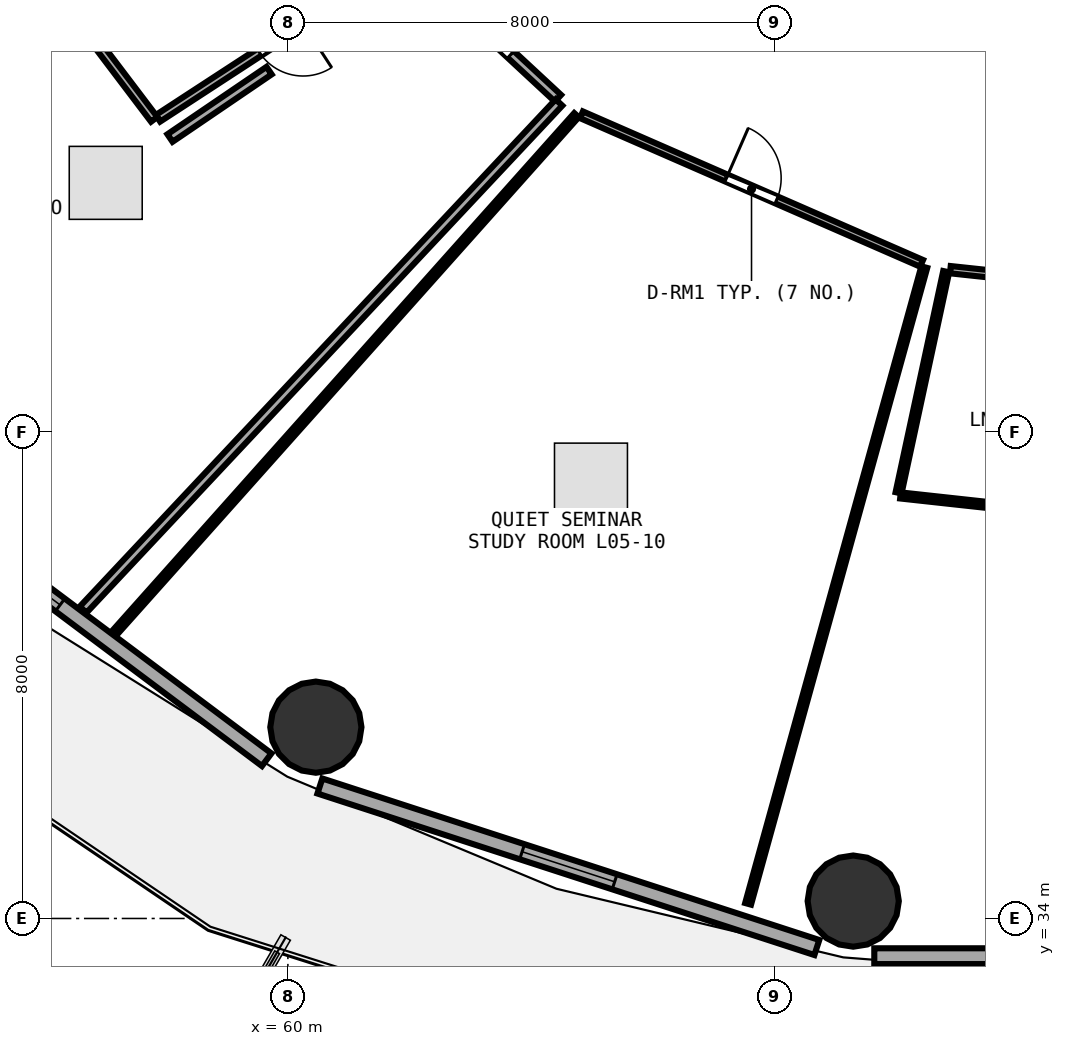
"""IFC4 building model, lengths in metres.
Left out: names, types, materials, properties, quantities, classifications, styles, units other than length and angle.
Written with IfcOpenShell. Run it as: python <this file> out.ifc"""

import sys

from ifc_helpers import new_model, si_unit, direction, frame, frame_2d, origin, origin_2d, place, context, subcontext, project, spatial, rectangle, circle, extrude, element, fill, save


model = new_model("IFC4")
c1 = context("Model", 3, precision=1e-05, world=origin(), true_north=direction((0.0, 1.0)))
c2 = subcontext(c1, "Body", "Model", "MODEL_VIEW")
j1 = project(units=[si_unit("LENGTHUNIT", "METRE"), si_unit("PLANEANGLEUNIT", "RADIAN")], contexts=[c1])
p1 = place(None, origin())
s1 = spatial("IfcSite", under=j1, at=p1, CompositionType="ELEMENT")
p2 = place(p1, origin())
s2 = spatial("IfcBuilding", under=s1, at=p2, CompositionType="ELEMENT")
p3 = place(p2, frame((0.0, 0.0, 22.5)))
s3 = spatial("IfcBuildingStorey", under=s2, at=p3, CompositionType="ELEMENT", Elevation=22.5)
for number, where, z_axis, x_axis in (
    (1, (60.46, 37.146, 0.0), (0.0, 0.0, 1.0), (1.0, 0.0, 0.0)),
    (2, (69.298, 34.286, 0.0), (0.0, 0.0, 1.0), (1.0, 0.0, 0.0)),
):
    element("IfcColumn", number, at=place(p3, frame(where, z_axis=z_axis, x_axis=x_axis)), inside=s3, PredefinedType="COLUMN", context=c2, shape_type="SweptSolid", body=[
        extrude(circle(Radius=0.75, at=origin_2d()), origin(), (0.0, 0.0, 1.0), 3.75),
    ])
p4 = place(p3, frame((53.016, 41.582, 0.0), z_axis=(0.0, 0.0, 1.0), x_axis=(0.80030733173, -0.599590005569, 0.0)))
e3 = element("IfcWall", 3, at=p4, inside=s3, PredefinedType="SOLIDWALL", context=c2, shape_type="SweptSolid", body=[
    extrude(rectangle(XDim=8.291, YDim=0.26, at=frame_2d((4.145, 0.0))), origin(), (0.0, 0.0, 1.0), 3.475),
])
p5 = place(p4, frame((2.445, 0.0, 0.85)))
e4 = element("IfcOpeningElement", 4, at=p5, cuts=e3, PredefinedType="OPENING", context=c2, shape_type="SweptSolid", body=[
    extrude(rectangle(XDim=1.6, YDim=1.45, at=frame_2d((0.8, 0.725))), frame((0.0, 0.14, 0.0), z_axis=(0.0, -1.0, 0.0), x_axis=(1.0, 0.0, 0.0)), (0.0, 0.0, 1.0), 0.28),
])
p6 = place(p3, frame((60.526, 36.178, 0.0), z_axis=(0.0, 0.0, 1.0), x_axis=(0.951039914291, -0.309068085421, 0.0)))
e5 = element("IfcWall", 5, at=p6, inside=s3, PredefinedType="SOLIDWALL", context=c2, shape_type="SweptSolid", body=[
    extrude(rectangle(XDim=8.594, YDim=0.26, at=frame_2d((4.297, 0.0))), origin(), (0.0, 0.0, 1.0), 3.475),
])
p7 = place(p6, frame((3.497, 0.0, 0.85)))
e6 = element("IfcOpeningElement", 6, at=p7, cuts=e5, PredefinedType="OPENING", context=c2, shape_type="SweptSolid", body=[
    extrude(rectangle(XDim=1.6, YDim=1.45, at=frame_2d((0.8, 0.725))), frame((0.0, 0.14, 0.0), z_axis=(0.0, -1.0, 0.0), x_axis=(1.0, 0.0, 0.0)), (0.0, 0.0, 1.0), 0.28),
])
p8 = place(p3, frame((69.644, 33.38, 0.0), z_axis=(0.0, 0.0, 1.0), x_axis=(1.0, 0.0, 0.0)))
e7 = element("IfcWall", 7, at=p8, inside=s3, PredefinedType="SOLIDWALL", context=c2, shape_type="SweptSolid", body=[
    extrude(rectangle(XDim=8.712, YDim=0.26, at=frame_2d((4.356, 0.0))), origin(), (0.0, 0.0, 1.0), 3.475),
])
p9 = place(p8, frame((4.456, 0.0, 0.85)))
e8 = element("IfcOpeningElement", 8, at=p9, cuts=e7, PredefinedType="OPENING", context=c2, shape_type="SweptSolid", body=[
    extrude(rectangle(XDim=1.6, YDim=1.45, at=frame_2d((0.8, 0.725))), frame((0.0, 0.14, 0.0), z_axis=(0.0, -1.0, 0.0), x_axis=(1.0, 0.0, 0.0)), (0.0, 0.0, 1.0), 0.28),
])
p10 = place(p3, frame((61.917, 49.8, 0.0), z_axis=(0.0, 0.0, 1.0), x_axis=(-0.837796261941, -0.545982988267, 0.0)))
e9 = element("IfcWall", 9, at=p10, inside=s3, PredefinedType="PLUMBINGWALL", context=c2, shape_type="SweptSolid", body=[
    extrude(rectangle(XDim=4.838, YDim=0.13, at=frame_2d((2.419, 0.0))), origin(), (0.0, 0.0, 1.0), 3.235),
])
p11 = place(p10, frame((1.989, 0.0, 0.0)))
e10 = element("IfcOpeningElement", 10, at=p11, cuts=e9, PredefinedType="OPENING", context=c2, shape_type="SweptSolid", body=[
    extrude(rectangle(XDim=0.86, YDim=2.05, at=frame_2d((0.43, 1.025))), frame((0.0, 0.075, 0.0), z_axis=(0.0, -1.0, 0.0), x_axis=(1.0, 0.0, 0.0)), (0.0, 0.0, 1.0), 0.15),
])
p12 = place(p3, frame((62.194, 49.575, 0.0), z_axis=(0.0, 0.0, 1.0), x_axis=(0.7329267348, -0.680307578538, 0.0)))
e11 = element("IfcWall", 11, at=p12, inside=s3, PredefinedType="PARTITIONING", context=c2, shape_type="SweptSolid", body=[
    extrude(rectangle(XDim=3.067, YDim=0.15, at=frame_2d((1.533, 0.0))), origin(), (0.0, 0.0, 1.0), 2.875),
])
p13 = place(p12, frame((1.059, 0.0, 0.0)))
e12 = element("IfcOpeningElement", 12, at=p13, cuts=e11, PredefinedType="OPENING", context=c2, shape_type="SweptSolid", body=[
    extrude(rectangle(XDim=0.95, YDim=2.08, at=frame_2d((0.475, 1.04))), frame((0.0, 0.085, 0.0), z_axis=(0.0, -1.0, 0.0), x_axis=(1.0, 0.0, 0.0)), (0.0, 0.0, 1.0), 0.17),
])
p14 = place(p3, frame((64.828, 47.217, 0.0), z_axis=(0.0, 0.0, 1.0), x_axis=(0.916419655578, -0.400218708797, 0.0)))
e13 = element("IfcWall", 13, at=p14, inside=s3, PredefinedType="PARTITIONING", context=c2, shape_type="SweptSolid", body=[
    extrude(rectangle(XDim=6.104, YDim=0.12, at=frame_2d((3.052, 0.0))), origin(), (0.0, 0.0, 1.0), 2.875),
])
p15 = place(p14, frame((2.602, 0.0, 0.0)))
e14 = element("IfcOpeningElement", 14, at=p15, cuts=e13, PredefinedType="OPENING", context=c2, shape_type="SweptSolid", body=[
    extrude(rectangle(XDim=0.9, YDim=2.08, at=frame_2d((0.45, 1.04))), frame((0.0, 0.07, 0.0), z_axis=(0.0, -1.0, 0.0), x_axis=(1.0, 0.0, 0.0)), (0.0, 0.0, 1.0), 0.14),
])
p16 = place(p3, frame((70.895, 44.67, 0.0), z_axis=(0.0, 0.0, 1.0), x_axis=(0.994302004983, -0.106599825921, 0.0)))
e15 = element("IfcWall", 15, at=p16, inside=s3, PredefinedType="PARTITIONING", context=c2, shape_type="SweptSolid", body=[
    extrude(rectangle(XDim=2.714, YDim=0.12, at=frame_2d((1.357, 0.0))), origin(), (0.0, 0.0, 1.0), 3.235),
])
p17 = place(p16, frame((0.907, 0.0, 0.0)))
e16 = element("IfcOpeningElement", 16, at=p17, cuts=e15, PredefinedType="OPENING", context=c2, shape_type="SweptSolid", body=[
    extrude(rectangle(XDim=0.9, YDim=2.08, at=frame_2d((0.45, 1.04))), frame((0.0, 0.07, 0.0), z_axis=(0.0, -1.0, 0.0), x_axis=(1.0, 0.0, 0.0)), (0.0, 0.0, 1.0), 0.14),
])
p18 = place(p3, frame((60.343, 52.222, 0.0), z_axis=(0.0, 0.0, 1.0), x_axis=(-0.926333713065, -0.376703931542, 0.0)))
e17 = element("IfcWall", 17, at=p18, inside=s3, PredefinedType="PARTITIONING", context=c2, shape_type="SweptSolid", body=[
    extrude(rectangle(XDim=12.099, YDim=0.1, at=frame_2d((6.05, 0.0))), origin(), (0.0, 0.0, 1.0), 2.875),
])
p19 = place(p3, frame((57.801, 47.142, 0.0), z_axis=(0.0, 0.0, 1.0), x_axis=(-0.60376191721, 0.797164692725, 0.0)))
e18 = element("IfcWall", 18, at=p19, inside=s3, PredefinedType="PLUMBINGWALL", context=c2, shape_type="SweptSolid", body=[
    extrude(rectangle(XDim=1.669, YDim=0.13, at=frame_2d((0.834, 0.0))), origin(), (0.0, 0.0, 1.0), 3.175),
])
p20 = place(p3, frame((64.458, 47.419, 0.0), z_axis=(0.0, 0.0, 1.0), x_axis=(-0.684261294523, -0.729236916796, 0.0)))
e19 = element("IfcWall", 19, at=p20, inside=s3, PredefinedType="PARTITIONING", context=c2, shape_type="SweptSolid", body=[
    extrude(rectangle(XDim=11.438, YDim=0.15, at=frame_2d((5.719, 0.0))), origin(), (0.0, 0.0, 1.0), 2.875),
])
p21 = place(p3, frame((58.061, 46.834, 0.0), z_axis=(0.0, 0.0, 1.0), x_axis=(0.826811291248, 0.562479411769, 0.0)))
e20 = element("IfcWall", 20, at=p21, inside=s3, PredefinedType="PARTITIONING", context=c2, shape_type="SweptSolid", body=[
    extrude(rectangle(XDim=1.971, YDim=0.15, at=frame_2d((0.985, 0.0))), origin(), (0.0, 0.0, 1.0), 3.48),
])
p22 = place(p3, frame((70.466, 44.711, 0.0), z_axis=(0.0, 0.0, 1.0), x_axis=(-0.26671307518, -0.963775977875, 0.0)))
e21 = element("IfcWall", 21, at=p22, inside=s3, PredefinedType="PARTITIONING", context=c2, shape_type="SweptSolid", body=[
    extrude(rectangle(XDim=10.865, YDim=0.1, at=frame_2d((5.432, 0.0))), origin(), (0.0, 0.0, 1.0), 2.875),
])
p23 = place(p3, frame((57.156, 38.706, 0.0), z_axis=(0.0, 0.0, 1.0), x_axis=(0.66580890104, 0.746122313897, 0.0)))
e22 = element("IfcWall", 22, at=p23, inside=s3, PredefinedType="PARTITIONING", context=c2, shape_type="SweptSolid", body=[
    extrude(rectangle(XDim=11.399, YDim=0.1, at=frame_2d((5.7, 0.0))), origin(), (0.0, 0.0, 1.0), 2.875),
])
p24 = place(p3, frame((73.525, 40.579, 0.0), z_axis=(0.0, 0.0, 1.0), x_axis=(-0.994070147468, 0.108740709544, 0.0)))
e23 = element("IfcWall", 23, at=p24, inside=s3, PredefinedType="PARTITIONING", context=c2, shape_type="SweptSolid", body=[
    extrude(rectangle(XDim=3.471, YDim=0.1, at=frame_2d((1.735, 0.0))), origin(), (0.0, 0.0, 1.0), 3.175),
])
p25 = place(p3, frame((70.043, 41.0, 0.0), z_axis=(0.0, 0.0, 1.0), x_axis=(0.210519412271, 0.977589677246, 0.0)))
e24 = element("IfcWall", 24, at=p25, inside=s3, PredefinedType="PARTITIONING", context=c2, shape_type="SweptSolid", body=[
    extrude(rectangle(XDim=3.72, YDim=0.1, at=frame_2d((1.86, 0.0))), origin(), (0.0, 0.0, 1.0), 3.175),
])
p26 = place(p5, origin())
e25 = element("IfcWindow", 25, at=p26, inside=s3, PartitioningType="SINGLE_PANEL", PredefinedType="WINDOW", context=c2, shape_type="SweptSolid", body=[
    extrude(rectangle(XDim=1.6, YDim=1.45, at=frame_2d((0.8, 0.725))), frame((0.0, 0.03, 0.0), z_axis=(0.0, -1.0, 0.0), x_axis=(1.0, 0.0, 0.0)), (0.0, 0.0, 1.0), 0.06),
])
fill(e4, e25)
p27 = place(p7, origin())
e26 = element("IfcWindow", 26, at=p27, inside=s3, PartitioningType="SINGLE_PANEL", PredefinedType="WINDOW", context=c2, shape_type="SweptSolid", body=[
    extrude(rectangle(XDim=1.6, YDim=1.45, at=frame_2d((0.8, 0.725))), frame((0.0, 0.03, 0.0), z_axis=(0.0, -1.0, 0.0), x_axis=(1.0, 0.0, 0.0)), (0.0, 0.0, 1.0), 0.06),
])
fill(e6, e26)
p28 = place(p11, origin())
e27 = element("IfcDoor", 27, at=p28, inside=s3, OperationType="SINGLE_SWING_LEFT", PredefinedType="DOOR", context=c2, shape_type="SweptSolid", body=[
    extrude(rectangle(XDim=0.86, YDim=2.05, at=frame_2d((0.43, 1.025))), frame((0.0, 0.025, 0.0), z_axis=(0.0, -1.0, 0.0), x_axis=(1.0, 0.0, 0.0)), (0.0, 0.0, 1.0), 0.05),
])
fill(e10, e27)
p29 = place(p13, origin())
e28 = element("IfcDoor", 28, at=p29, inside=s3, OperationType="SINGLE_SWING_RIGHT", PredefinedType="DOOR", context=c2, shape_type="SweptSolid", body=[
    extrude(rectangle(XDim=0.95, YDim=2.08, at=frame_2d((0.475, 1.04))), frame((0.0, 0.025, 0.0), z_axis=(0.0, -1.0, 0.0), x_axis=(1.0, 0.0, 0.0)), (0.0, 0.0, 1.0), 0.05),
])
fill(e12, e28)
p30 = place(p15, origin())
e29 = element("IfcDoor", 29, at=p30, inside=s3, OperationType="SINGLE_SWING_LEFT", PredefinedType="DOOR", context=c2, shape_type="SweptSolid", body=[
    extrude(rectangle(XDim=0.9, YDim=2.08, at=frame_2d((0.45, 1.04))), frame((0.0, 0.025, 0.0), z_axis=(0.0, -1.0, 0.0), x_axis=(1.0, 0.0, 0.0)), (0.0, 0.0, 1.0), 0.05),
])
fill(e14, e29)
save(model, sys.argv[1])
